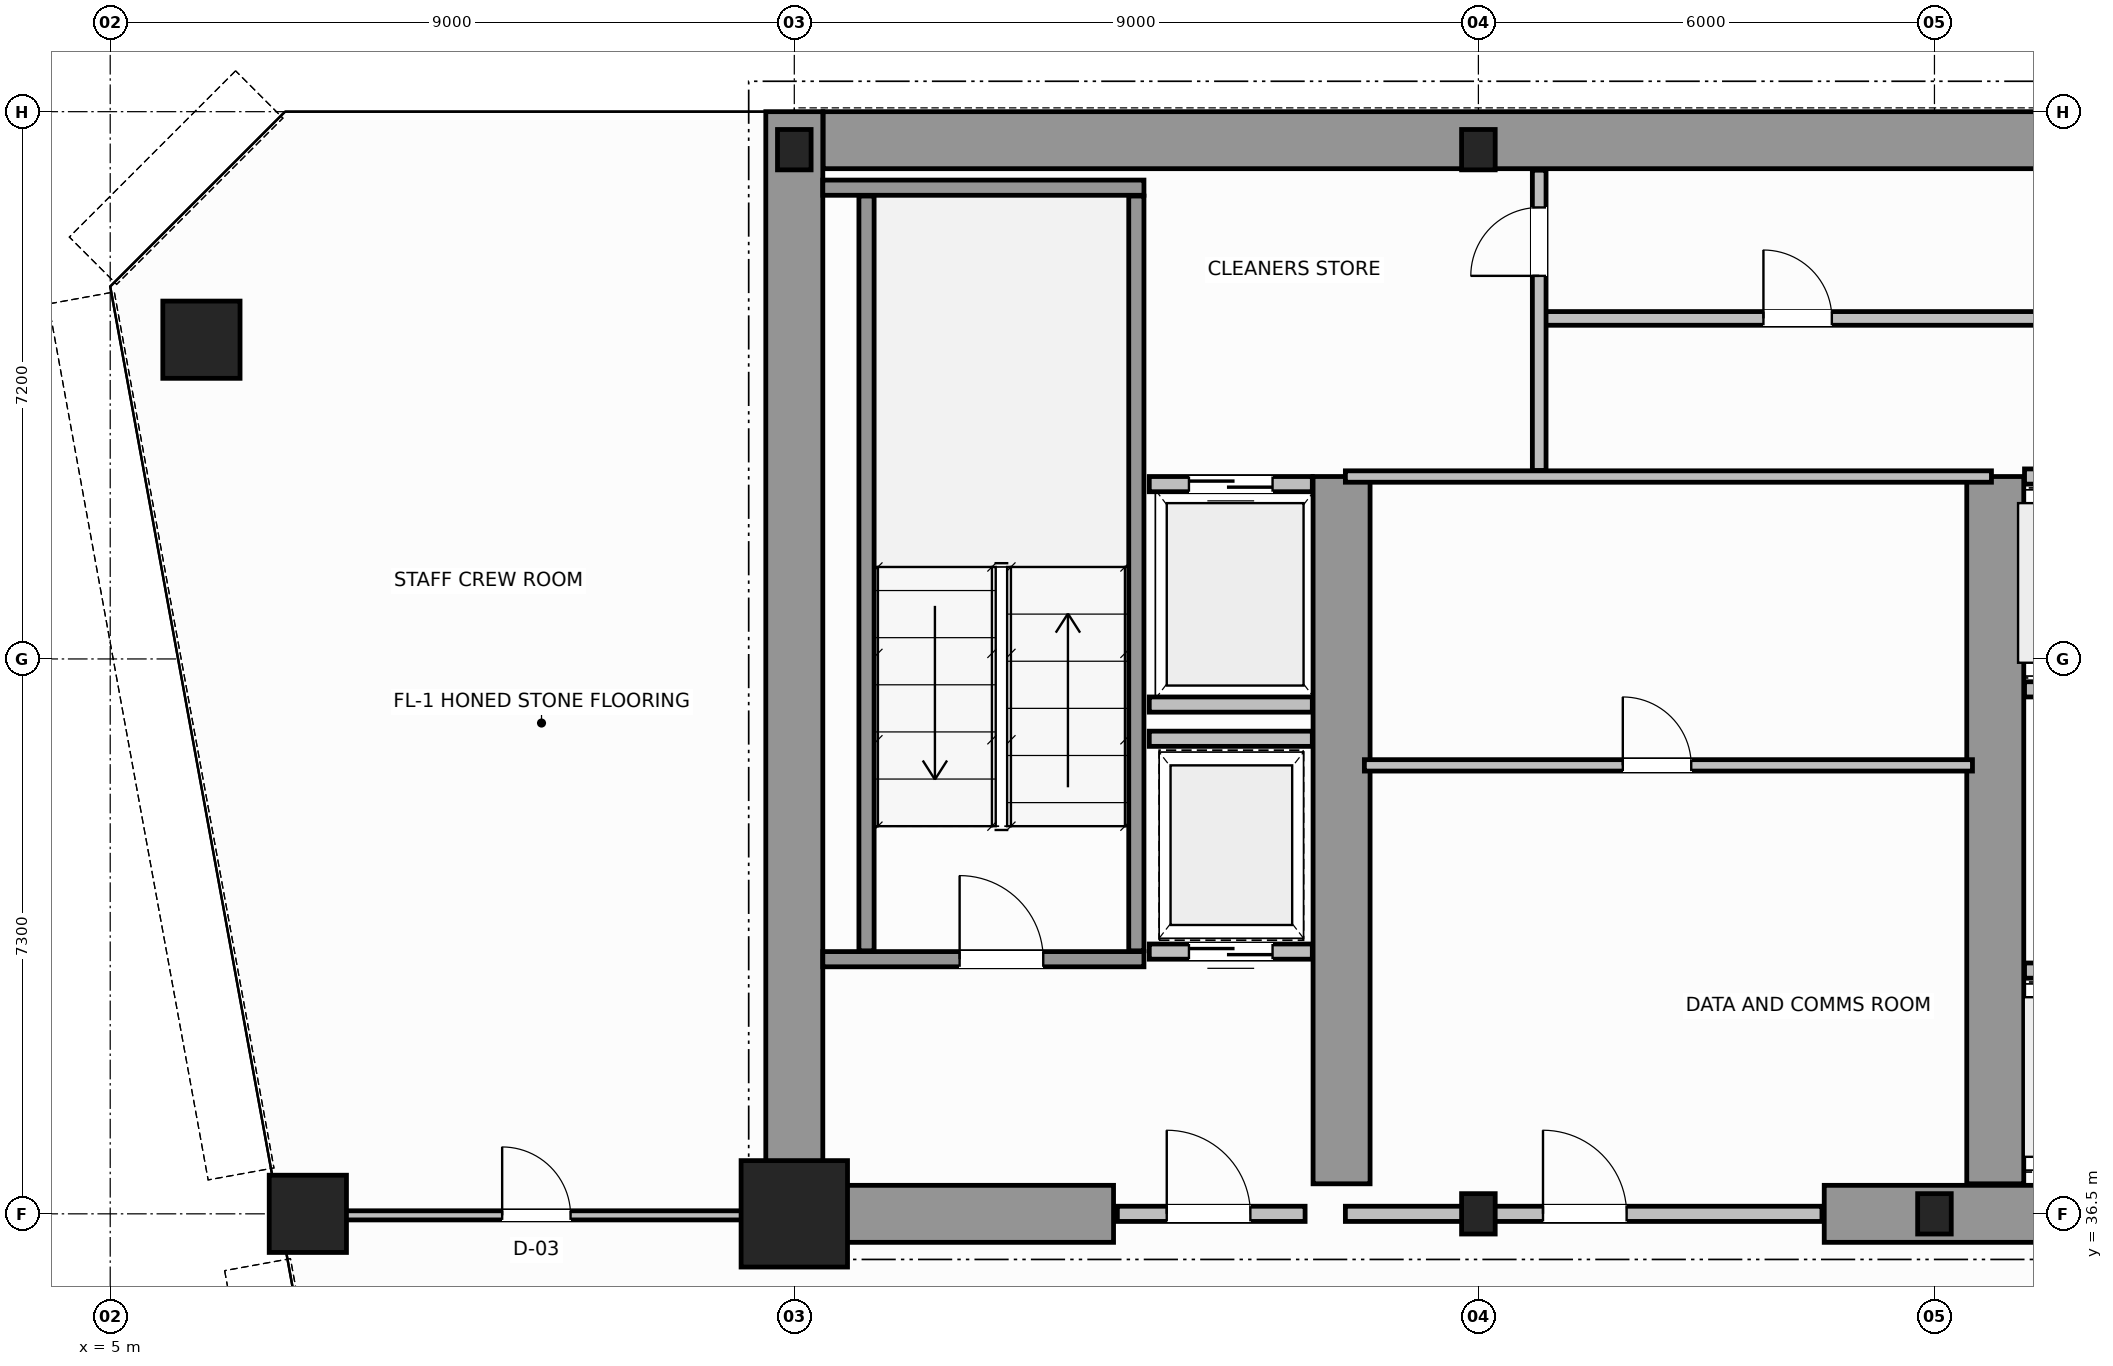
"""IFC4 building model, lengths in metres.
Left out: names, types, materials, properties, quantities, classifications, styles, units other than length and angle.
Written with IfcOpenShell. Run it as: python <this file> out.ifc"""

import sys

from ifc_helpers import new_model, si_unit, direction, frame, frame_2d, origin, origin_2d, place, context, subcontext, project, spatial, rectangle, hollow_circle, i_section, extrude, source, transform, mapped, element, fill, save


model = new_model("IFC4")
c1 = context("Model", 3, precision=1e-05, world=origin(), true_north=direction((0.0, 1.0)))
c2 = subcontext(c1, "Body", "Model", "MODEL_VIEW")
j1 = project(units=[si_unit("LENGTHUNIT", "METRE"), si_unit("PLANEANGLEUNIT", "RADIAN")], contexts=[c1])
p1 = place(None, origin())
s1 = spatial("IfcSite", under=j1, at=p1, CompositionType="ELEMENT")
p2 = place(p1, origin())
s2 = spatial("IfcBuilding", under=s1, at=p2, CompositionType="ELEMENT")
p3 = place(p2, frame((0.0, 0.0, 107.2)))
s3 = spatial("IfcBuildingStorey", under=s2, at=p3, CompositionType="ELEMENT", Elevation=107.2)
m1 = source(origin(), c2, "Body", "SweptSolid", [
    extrude(rectangle(XDim=1.4, YDim=1.4, at=origin_2d()), origin(), (0.0, 0.0, 1.0), 3.8),
])
p4 = place(p3, frame((14.0, 36.5, 0.0), z_axis=(0.0, 0.0, 1.0), x_axis=(1.0, 0.0, 0.0)))
e1 = element("IfcColumn", 1, at=p4, inside=s3, PredefinedType="COLUMN", context=c2, shape_type="MappedRepresentation", body=[
    mapped(m1, transform((0.0, 0.0, 0.0), scale=1.0)),
])
m2 = source(origin(), c2, "Body", "SweptSolid", [
    extrude(i_section(OverallWidth=0.442, OverallDepth=0.531, WebThickness=0.065, FlangeThickness=0.076, FilletRadius=0.015, at=origin_2d()), origin(), (0.0, 0.0, 1.0), 3.8),
])
for number, where, z_axis, x_axis in (
    (2, (23.0, 36.5, 0.0), (0.0, 0.0, 1.0), (1.0, 0.0, 0.0)),
    (3, (29.0, 36.5, 0.0), (0.0, 0.0, 1.0), (1.0, 0.0, 0.0)),
    (4, (14.0, 50.5, 0.0), (0.0, 0.0, 1.0), (1.0, 0.0, 0.0)),
    (5, (23.0, 50.5, 0.0), (0.0, 0.0, 1.0), (1.0, 0.0, 0.0)),
):
    element("IfcColumn", number, at=place(p3, frame(where, z_axis=z_axis, x_axis=x_axis)), inside=s3, PredefinedType="COLUMN", context=c2, shape_type="MappedRepresentation", body=[
        mapped(m2, transform((0.0, 0.0, 0.0), scale=1.0)),
    ])
m3 = source(origin(), c2, "Body", "SweptSolid", [
    extrude(hollow_circle(Radius=0.508, WallThickness=0.045, at=origin_2d()), origin(), (0.0, 0.0, 1.0), 3.8),
])
for number, where, z_axis, x_axis in (
    (6, (6.2, 48.0, 0.0), (0.0, 0.0, 1.0), (1.0, 0.0, 0.0)),
    (7, (7.6, 36.5, 0.0), (0.0, 0.0, 1.0), (1.0, 0.0, 0.0)),
):
    element("IfcColumn", number, at=place(p3, frame(where, z_axis=z_axis, x_axis=x_axis)), inside=s3, PredefinedType="COLUMN", context=c2, shape_type="MappedRepresentation", body=[
        mapped(m3, transform((0.0, 0.0, 0.0), scale=1.0)),
    ])
p5 = place(p3, frame((14.379, 50.625, 0.0), z_axis=(0.0, 0.0, 1.0), x_axis=(1.0, 0.0, 0.0)))
e8 = element("IfcWall", 8, at=p5, inside=s3, PredefinedType="SHEAR", context=c2, shape_type="SweptSolid", body=[
    extrude(rectangle(XDim=19.619, YDim=0.75, at=frame_2d((9.81, 0.0))), origin(), (0.0, 0.0, 1.0), 3.8),
])
p6 = place(p3, frame((14.0, 36.5, 0.0), z_axis=(0.0, 0.0, 1.0), x_axis=(0.0, 1.0, 0.0)))
e9 = element("IfcWall", 9, at=p6, inside=s3, PredefinedType="SHEAR", context=c2, shape_type="SweptSolid", body=[
    extrude(rectangle(XDim=14.5, YDim=0.75, at=frame_2d((7.25, 0.0))), origin(), (0.0, 0.0, 1.0), 3.8),
])
p7 = place(p3, frame((14.395, 36.5, 0.0), z_axis=(0.0, 0.0, 1.0), x_axis=(1.0, 0.0, 0.0)))
e10 = element("IfcWall", 10, at=p7, inside=s3, PredefinedType="SHEAR", context=c2, shape_type="SweptSolid", body=[
    extrude(rectangle(XDim=3.805, YDim=0.75, at=frame_2d((1.902, 0.0))), origin(), (0.0, 0.0, 1.0), 2.38),
])
p8 = place(p3, frame((27.55, 36.5, 0.0), z_axis=(0.0, 0.0, 1.0), x_axis=(1.0, 0.0, 0.0)))
e11 = element("IfcWall", 11, at=p8, inside=s3, PredefinedType="SHEAR", context=c2, shape_type="SweptSolid", body=[
    extrude(rectangle(XDim=4.5, YDim=0.75, at=frame_2d((2.25, 0.0))), origin(), (0.0, 0.0, 1.0), 3.8),
])
for number, where, z_axis, x_axis in (
    (12, (21.2, 36.895, 0.0), (0.0, 0.0, 1.0), (0.0, 1.0, 0.0)),
    (13, (29.8, 36.895, 0.0), (0.0, 0.0, 1.0), (0.0, 1.0, 0.0)),
):
    element("IfcWall", number, at=place(p3, frame(where, z_axis=z_axis, x_axis=x_axis)), inside=s3, PredefinedType="SHEAR", context=c2, shape_type="SweptSolid", body=[
        extrude(rectangle(XDim=9.305, YDim=0.75, at=frame_2d((4.652, 0.0))), origin(), (0.0, 0.0, 1.0), 3.8),
    ])
p9 = place(p3, frame((14.375, 39.85, 0.0), z_axis=(0.0, 0.0, 1.0), x_axis=(1.0, 0.0, 0.0)))
e14 = element("IfcWall", 14, at=p9, inside=s3, PredefinedType="SOLIDWALL", context=c2, shape_type="SweptSolid", body=[
    extrude(rectangle(XDim=4.225, YDim=0.2, at=frame_2d((2.113, 0.0))), origin(), (0.0, 0.0, 1.0), 3.8),
])
p10 = place(p9, frame((1.8, 0.0, 0.0)))
e15 = element("IfcOpeningElement", 15, at=p10, cuts=e14, PredefinedType="OPENING", context=c2, shape_type="SweptSolid", body=[
    extrude(rectangle(XDim=1.1, YDim=2.15, at=frame_2d((0.55, 1.075))), frame((0.0, 0.11, 0.0), z_axis=(0.0, -1.0, 0.0), x_axis=(1.0, 0.0, 0.0)), (0.0, 0.0, 1.0), 0.22),
])
p11 = place(p3, frame((14.375, 50.0, 0.0), z_axis=(0.0, 0.0, 1.0), x_axis=(1.0, 0.0, 0.0)))
e16 = element("IfcWall", 16, at=p11, inside=s3, PredefinedType="SOLIDWALL", context=c2, shape_type="SweptSolid", body=[
    extrude(rectangle(XDim=4.225, YDim=0.2, at=frame_2d((2.113, 0.0))), origin(), (0.0, 0.0, 1.0), 3.8),
])
for number, where, z_axis, x_axis in (
    (17, (14.95, 39.96, 0.0), (0.0, 0.0, 1.0), (0.0, 1.0, 0.0)),
    (18, (18.5, 39.96, 0.0), (0.0, 0.0, 1.0), (0.0, 1.0, 0.0)),
):
    element("IfcWall", number, at=place(p3, frame(where, z_axis=z_axis, x_axis=x_axis)), inside=s3, PredefinedType="SOLIDWALL", context=c2, shape_type="SweptSolid", body=[
        extrude(rectangle(XDim=9.93, YDim=0.2, at=frame_2d((4.965, 0.0))), origin(), (0.0, 0.0, 1.0), 3.8),
    ])
p12 = place(p3, frame((18.25, 36.5, 0.0), z_axis=(0.0, 0.0, 1.0), x_axis=(1.0, 0.0, 0.0)))
e19 = element("IfcWall", 19, at=p12, inside=s3, PredefinedType="SOLIDWALL", context=c2, shape_type="SweptSolid", body=[
    extrude(rectangle(XDim=2.47, YDim=0.2, at=frame_2d((1.235, 0.0))), origin(), (0.0, 0.0, 1.0), 2.37),
])
p13 = place(p12, frame((0.65, 0.0, 0.0)))
e20 = element("IfcOpeningElement", 20, at=p13, cuts=e19, PredefinedType="OPENING", context=c2, shape_type="SweptSolid", body=[
    extrude(rectangle(XDim=1.1, YDim=2.15, at=frame_2d((0.55, 1.075))), frame((0.0, 0.11, 0.0), z_axis=(0.0, -1.0, 0.0), x_axis=(1.0, 0.0, 0.0)), (0.0, 0.0, 1.0), 0.22),
])
p14 = place(p3, frame((30.185, 39.7, 0.0), z_axis=(0.0, 0.0, 1.0), x_axis=(1.0, 0.0, 0.0)))
e21 = element("IfcWall", 21, at=p14, inside=s3, PredefinedType="SOLIDWALL", context=c2, shape_type="SweptSolid", body=[
    extrude(rectangle(XDim=1.845, YDim=0.2, at=frame_2d((0.922, 0.0))), origin(), (0.0, 0.0, 1.0), 3.58),
])
p15 = place(p14, frame((0.373, 0.0, 0.0)))
e22 = element("IfcOpeningElement", 22, at=p15, cuts=e21, PredefinedType="OPENING", context=c2, shape_type="SweptSolid", body=[
    extrude(rectangle(XDim=1.1, YDim=2.15, at=frame_2d((0.55, 1.075))), frame((0.0, 0.11, 0.0), z_axis=(0.0, -1.0, 0.0), x_axis=(1.0, 0.0, 0.0)), (0.0, 0.0, 1.0), 0.22),
])
p16 = place(p3, frame((30.185, 43.4, 0.0), z_axis=(0.0, 0.0, 1.0), x_axis=(1.0, 0.0, 0.0)))
e23 = element("IfcWall", 23, at=p16, inside=s3, PredefinedType="SOLIDWALL", context=c2, shape_type="SweptSolid", body=[
    extrude(rectangle(XDim=1.725, YDim=0.2, at=frame_2d((0.862, 0.0))), origin(), (0.0, 0.0, 1.0), 3.58),
])
p17 = place(p16, frame((0.313, 0.0, 0.0)))
e24 = element("IfcOpeningElement", 24, at=p17, cuts=e23, PredefinedType="OPENING", context=c2, shape_type="SweptSolid", body=[
    extrude(rectangle(XDim=1.1, YDim=2.15, at=frame_2d((0.55, 1.075))), frame((0.0, 0.11, 0.0), z_axis=(0.0, -1.0, 0.0), x_axis=(1.0, 0.0, 0.0)), (0.0, 0.0, 1.0), 0.22),
])
p18 = place(p3, frame((30.185, 46.2, 0.0), z_axis=(0.0, 0.0, 1.0), x_axis=(1.0, 0.0, 0.0)))
e25 = element("IfcWall", 25, at=p18, inside=s3, PredefinedType="SOLIDWALL", context=c2, shape_type="SweptSolid", body=[
    extrude(rectangle(XDim=1.725, YDim=0.2, at=frame_2d((0.862, 0.0))), origin(), (0.0, 0.0, 1.0), 3.58),
])
p19 = place(p3, frame((18.67, 46.1, 0.0), z_axis=(0.0, 0.0, 1.0), x_axis=(1.0, 0.0, 0.0)))
e26 = element("IfcWall", 26, at=p19, inside=s3, PredefinedType="SOLIDWALL", context=c2, shape_type="SweptSolid", body=[
    extrude(rectangle(XDim=2.145, YDim=0.2, at=frame_2d((1.073, 0.0))), origin(), (0.0, 0.0, 1.0), 3.58),
])
p20 = place(p19, frame((0.522, 0.0, 0.0)))
e27 = element("IfcOpeningElement", 27, at=p20, cuts=e26, PredefinedType="OPENING", context=c2, shape_type="SweptSolid", body=[
    extrude(rectangle(XDim=1.1, YDim=2.15, at=frame_2d((0.55, 1.075))), frame((0.0, 0.11, 0.0), z_axis=(0.0, -1.0, 0.0), x_axis=(1.0, 0.0, 0.0)), (0.0, 0.0, 1.0), 0.22),
])
p21 = place(p3, frame((18.67, 43.2, 0.0), z_axis=(0.0, 0.0, 1.0), x_axis=(1.0, 0.0, 0.0)))
e28 = element("IfcWall", 28, at=p21, inside=s3, PredefinedType="SOLIDWALL", context=c2, shape_type="SweptSolid", body=[
    extrude(rectangle(XDim=2.145, YDim=0.2, at=frame_2d((1.073, 0.0))), origin(), (0.0, 0.0, 1.0), 3.58),
])
p22 = place(p3, frame((18.67, 39.95, 0.0), z_axis=(0.0, 0.0, 1.0), x_axis=(1.0, 0.0, 0.0)))
e29 = element("IfcWall", 29, at=p22, inside=s3, PredefinedType="SOLIDWALL", context=c2, shape_type="SweptSolid", body=[
    extrude(rectangle(XDim=2.145, YDim=0.2, at=frame_2d((1.073, 0.0))), origin(), (0.0, 0.0, 1.0), 3.58),
])
p23 = place(p22, frame((0.522, 0.0, 0.0)))
e30 = element("IfcOpeningElement", 30, at=p23, cuts=e29, PredefinedType="OPENING", context=c2, shape_type="SweptSolid", body=[
    extrude(rectangle(XDim=1.1, YDim=2.15, at=frame_2d((0.55, 1.075))), frame((0.0, 0.11, 0.0), z_axis=(0.0, -1.0, 0.0), x_axis=(1.0, 0.0, 0.0)), (0.0, 0.0, 1.0), 0.22),
])
p24 = place(p3, frame((18.67, 42.75, 0.0), z_axis=(0.0, 0.0, 1.0), x_axis=(1.0, 0.0, 0.0)))
e31 = element("IfcWall", 31, at=p24, inside=s3, PredefinedType="SOLIDWALL", context=c2, shape_type="SweptSolid", body=[
    extrude(rectangle(XDim=2.145, YDim=0.2, at=frame_2d((1.073, 0.0))), origin(), (0.0, 0.0, 1.0), 3.58),
])
p25 = place(p3, frame((21.25, 36.5, 0.0), z_axis=(0.0, 0.0, 1.0), x_axis=(1.0, 0.0, 0.0)))
e32 = element("IfcWall", 32, at=p25, inside=s3, PredefinedType="SOLIDWALL", context=c2, shape_type="SweptSolid", body=[
    extrude(rectangle(XDim=6.27, YDim=0.2, at=frame_2d((3.135, 0.0))), origin(), (0.0, 0.0, 1.0), 2.37),
])
p26 = place(p25, frame((2.6, 0.0, 0.0)))
e33 = element("IfcOpeningElement", 33, at=p26, cuts=e32, PredefinedType="OPENING", context=c2, shape_type="SweptSolid", body=[
    extrude(rectangle(XDim=1.1, YDim=2.15, at=frame_2d((0.55, 1.075))), frame((0.0, 0.11, 0.0), z_axis=(0.0, -1.0, 0.0), x_axis=(1.0, 0.0, 0.0)), (0.0, 0.0, 1.0), 0.22),
])
p27 = place(p3, frame((21.25, 46.2, 0.0), z_axis=(0.0, 0.0, 1.0), x_axis=(1.0, 0.0, 0.0)))
e34 = element("IfcWall", 34, at=p27, inside=s3, PredefinedType="PARTITIONING", context=c2, shape_type="SweptSolid", body=[
    extrude(rectangle(XDim=8.5, YDim=0.15, at=frame_2d((4.25, 0.0))), origin(), (0.0, 0.0, 1.0), 3.58),
])
p28 = place(p3, frame((21.5, 42.4, 0.0), z_axis=(0.0, 0.0, 1.0), x_axis=(1.0, 0.0, 0.0)))
e35 = element("IfcWall", 35, at=p28, inside=s3, PredefinedType="PARTITIONING", context=c2, shape_type="SweptSolid", body=[
    extrude(rectangle(XDim=8.0, YDim=0.15, at=frame_2d((4.0, 0.0))), origin(), (0.0, 0.0, 1.0), 3.58),
])
p29 = place(p28, frame((3.4, 0.0, 0.0)))
e36 = element("IfcOpeningElement", 36, at=p29, cuts=e35, PredefinedType="OPENING", context=c2, shape_type="SweptSolid", body=[
    extrude(rectangle(XDim=0.9, YDim=2.1, at=frame_2d((0.45, 1.05))), frame((0.0, 0.085, 0.0), z_axis=(0.0, -1.0, 0.0), x_axis=(1.0, 0.0, 0.0)), (0.0, 0.0, 1.0), 0.17),
])
p30 = place(p3, frame((23.85, 48.28, 0.0), z_axis=(0.0, 0.0, 1.0), x_axis=(1.0, 0.0, 0.0)))
e37 = element("IfcWall", 37, at=p30, inside=s3, PredefinedType="PLUMBINGWALL", context=c2, shape_type="SweptSolid", body=[
    extrude(rectangle(XDim=15.03, YDim=0.18, at=frame_2d((7.515, 0.0))), origin(), (0.0, 0.0, 1.0), 3.58),
])
p31 = place(p30, frame((2.9, 0.0, 0.0)))
e38 = element("IfcOpeningElement", 38, at=p31, cuts=e37, PredefinedType="OPENING", context=c2, shape_type="SweptSolid", body=[
    extrude(rectangle(XDim=0.9, YDim=2.15, at=frame_2d((0.45, 1.075))), frame((0.0, 0.1, 0.0), z_axis=(0.0, -1.0, 0.0), x_axis=(1.0, 0.0, 0.0)), (0.0, 0.0, 1.0), 0.2),
])
p32 = place(p30, frame((10.4, 0.0, 0.0)))
e39 = element("IfcOpeningElement", 39, at=p32, cuts=e37, PredefinedType="OPENING", context=c2, shape_type="SweptSolid", body=[
    extrude(rectangle(XDim=0.9, YDim=2.15, at=frame_2d((0.45, 1.075))), frame((0.0, 0.1, 0.0), z_axis=(0.0, -1.0, 0.0), x_axis=(1.0, 0.0, 0.0)), (0.0, 0.0, 1.0), 0.2),
])
p33 = place(p3, frame((23.8, 46.28, 0.0), z_axis=(0.0, 0.0, 1.0), x_axis=(0.0, 1.0, 0.0)))
e40 = element("IfcWall", 40, at=p33, inside=s3, PredefinedType="PLUMBINGWALL", context=c2, shape_type="SweptSolid", body=[
    extrude(rectangle(XDim=3.95, YDim=0.18, at=frame_2d((1.975, 0.0))), origin(), (0.0, 0.0, 1.0), 3.58),
])
p34 = place(p33, frame((2.56, 0.0, 0.0)))
e41 = element("IfcOpeningElement", 41, at=p34, cuts=e40, PredefinedType="OPENING", context=c2, shape_type="SweptSolid", body=[
    extrude(rectangle(XDim=0.9, YDim=2.15, at=frame_2d((0.45, 1.075))), frame((0.0, 0.1, 0.0), z_axis=(0.0, -1.0, 0.0), x_axis=(1.0, 0.0, 0.0)), (0.0, 0.0, 1.0), 0.2),
])
p35 = place(p3, frame((7.272, 36.48, 0.0), z_axis=(0.0, 0.0, 1.0), x_axis=(1.0, 0.0, 0.0)))
e42 = element("IfcWall", 42, at=p35, inside=s3, PredefinedType="PARTITIONING", context=c2, shape_type="SweptSolid", body=[
    extrude(rectangle(XDim=6.667, YDim=0.12, at=frame_2d((3.334, 0.0))), origin(), (0.0, 0.0, 1.0), 2.87),
])
p36 = place(p35, frame((2.884, 0.0, 0.0)))
e43 = element("IfcOpeningElement", 43, at=p36, cuts=e42, PredefinedType="OPENING", context=c2, shape_type="SweptSolid", body=[
    extrude(rectangle(XDim=0.9, YDim=2.15, at=frame_2d((0.45, 1.075))), frame((0.0, 0.07, 0.0), z_axis=(0.0, -1.0, 0.0), x_axis=(1.0, 0.0, 0.0)), (0.0, 0.0, 1.0), 0.14),
])
m4 = source(origin(), c2, "Body", "SweptSolid", [
    extrude(rectangle(XDim=1.1, YDim=2.15, at=frame_2d((0.55, 1.075))), frame((0.0, 0.025, 0.0), z_axis=(0.0, -1.0, 0.0), x_axis=(1.0, 0.0, 0.0)), (0.0, 0.0, 1.0), 0.05),
])
p37 = place(p10, origin())
e44 = element("IfcDoor", 44, at=p37, inside=s3, OperationType="SINGLE_SWING_LEFT", PredefinedType="DOOR", context=c2, shape_type="MappedRepresentation", body=[
    mapped(m4, transform((0.0, 0.0, 0.0), scale=1.0)),
])
fill(e15, e44)
p38 = place(p13, origin())
e45 = element("IfcDoor", 45, at=p38, inside=s3, OperationType="SINGLE_SWING_RIGHT", PredefinedType="DOOR", context=c2, shape_type="MappedRepresentation", body=[
    mapped(m4, transform((0.0, 0.0, 0.0), scale=1.0)),
])
fill(e20, e45)
p39 = place(p20, origin())
e46 = element("IfcDoor", 46, at=p39, inside=s3, OperationType="DOUBLE_DOOR_SLIDING", PredefinedType="DOOR", context=c2, shape_type="MappedRepresentation", body=[
    mapped(m4, transform((0.0, 0.0, 0.0), scale=1.0)),
])
fill(e27, e46)
p40 = place(p23, origin())
e47 = element("IfcDoor", 47, at=p40, inside=s3, OperationType="DOUBLE_DOOR_SLIDING", PredefinedType="DOOR", context=c2, shape_type="MappedRepresentation", body=[
    mapped(m4, transform((0.0, 0.0, 0.0), scale=1.0)),
])
fill(e30, e47)
p41 = place(p26, origin())
e48 = element("IfcDoor", 48, at=p41, inside=s3, OperationType="SINGLE_SWING_LEFT", PredefinedType="DOOR", context=c2, shape_type="MappedRepresentation", body=[
    mapped(m4, transform((0.0, 0.0, 0.0), scale=1.0)),
])
fill(e33, e48)
m5 = source(origin(), c2, "Body", "SweptSolid", [
    extrude(rectangle(XDim=0.9, YDim=2.1, at=frame_2d((0.45, 1.05))), frame((0.0, 0.025, 0.0), z_axis=(0.0, -1.0, 0.0), x_axis=(1.0, 0.0, 0.0)), (0.0, 0.0, 1.0), 0.05),
])
p42 = place(p29, origin())
e49 = element("IfcDoor", 49, at=p42, inside=s3, OperationType="SINGLE_SWING_RIGHT", PredefinedType="DOOR", context=c2, shape_type="MappedRepresentation", body=[
    mapped(m5, transform((0.0, 0.0, 0.0), scale=1.0)),
])
fill(e36, e49)
m6 = source(origin(), c2, "Body", "SweptSolid", [
    extrude(rectangle(XDim=0.9, YDim=2.15, at=frame_2d((0.45, 1.075))), frame((0.0, 0.025, 0.0), z_axis=(0.0, -1.0, 0.0), x_axis=(1.0, 0.0, 0.0)), (0.0, 0.0, 1.0), 0.05),
])
p43 = place(p34, origin())
e50 = element("IfcDoor", 50, at=p43, inside=s3, OperationType="SINGLE_SWING_LEFT", PredefinedType="DOOR", context=c2, shape_type="MappedRepresentation", body=[
    mapped(m6, transform((0.0, 0.0, 0.0), scale=1.0)),
])
fill(e41, e50)
p44 = place(p31, origin())
e51 = element("IfcDoor", 51, at=p44, inside=s3, OperationType="SINGLE_SWING_RIGHT", PredefinedType="DOOR", context=c2, shape_type="MappedRepresentation", body=[
    mapped(m6, transform((0.0, 0.0, 0.0), scale=1.0)),
])
fill(e38, e51)
p45 = place(p36, origin())
e52 = element("IfcDoor", 52, at=p45, inside=s3, OperationType="SINGLE_SWING_LEFT", PredefinedType="DOOR", context=c2, shape_type="MappedRepresentation", body=[
    mapped(m6, transform((0.0, 0.0, 0.0), scale=1.0)),
])
fill(e43, e52)
save(model, sys.argv[1])
